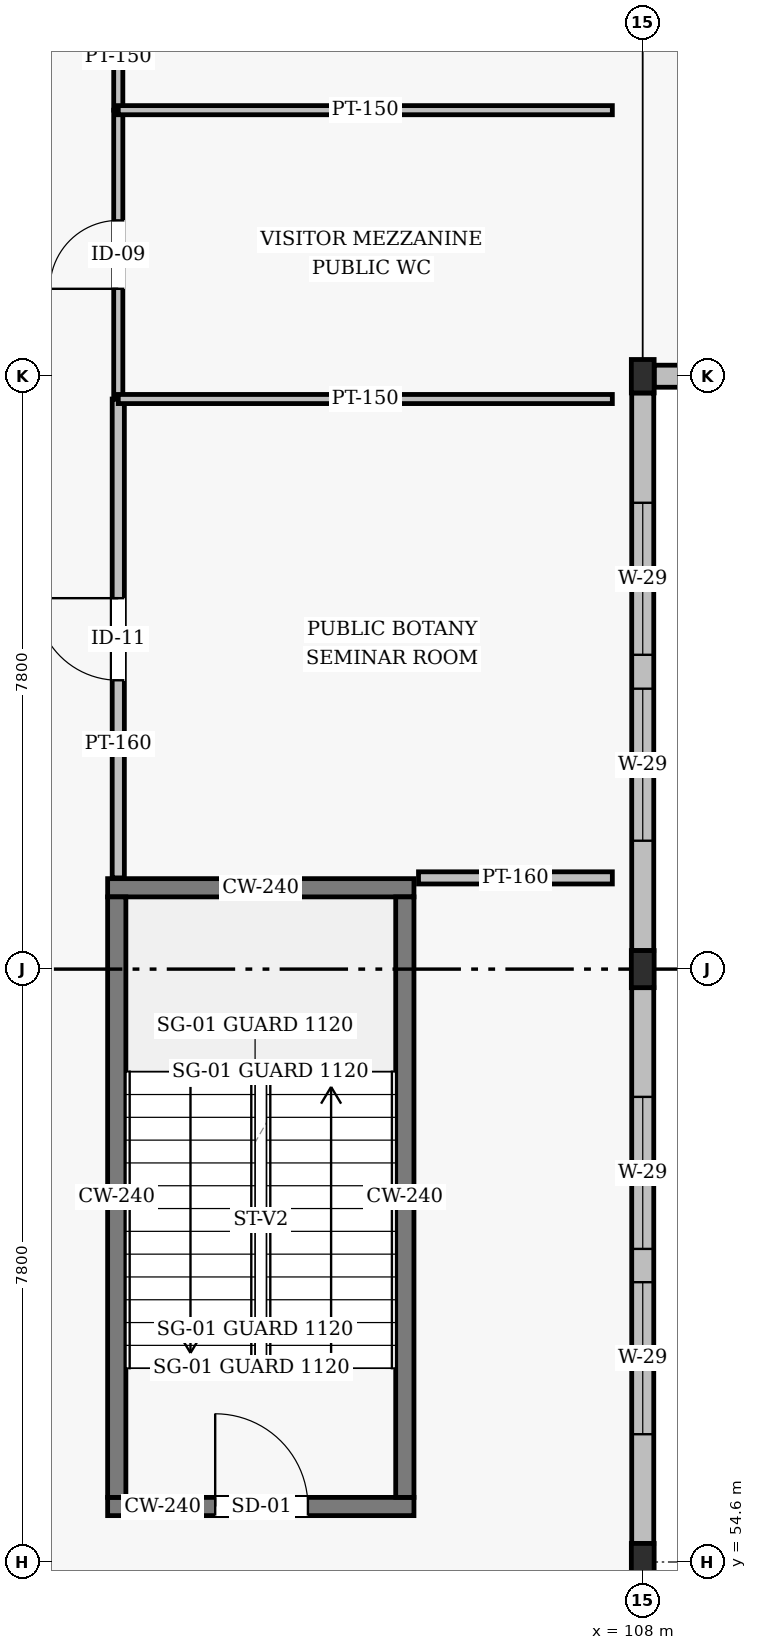
"""IFC4 building model, lengths in metres.
Left out: names, types, materials, properties, quantities, classifications, styles, units other than length and angle.
Written with IfcOpenShell. Run it as: python <this file> out.ifc"""

import sys

from ifc_helpers import new_model, si_unit, direction, frame, frame_2d, origin, origin_2d, place, context, subcontext, project, spatial, rectangle, i_section, extrude, element, fill, save


model = new_model("IFC4")
c1 = context("Model", 3, precision=1e-05, world=origin(), true_north=direction((0.0, 1.0)))
c2 = subcontext(c1, "Body", "Model", "MODEL_VIEW")
j1 = project(units=[si_unit("LENGTHUNIT", "METRE"), si_unit("PLANEANGLEUNIT", "RADIAN")], contexts=[c1])
p1 = place(None, origin())
s1 = spatial("IfcSite", under=j1, at=p1, CompositionType="ELEMENT")
p2 = place(p1, origin())
s2 = spatial("IfcBuilding", under=s1, at=p2, CompositionType="ELEMENT")
p3 = place(p2, frame((0.0, 0.0, 4.8)))
s3 = spatial("IfcBuildingStorey", under=s2, at=p3, CompositionType="ELEMENT", Elevation=4.8)
for number, where, z_axis, x_axis in (
    (1, (108.0, 54.6, 0.0), (0.0, 0.0, 1.0), (1.0, 0.0, 0.0)),
    (2, (108.0, 62.4, 0.0), (0.0, 0.0, 1.0), (1.0, 0.0, 0.0)),
):
    element("IfcColumn", number, at=place(p3, frame(where, z_axis=z_axis, x_axis=x_axis)), inside=s3, PredefinedType="COLUMN", context=c2, shape_type="SweptSolid", body=[
        extrude(i_section(OverallWidth=0.3, OverallDepth=0.488, WebThickness=0.011, FlangeThickness=0.018, FilletRadius=0.024, at=origin_2d()), origin(), (0.0, 0.0, 1.0), 4.2),
    ])
p4 = place(p3, frame((108.0, 70.2, 0.0), z_axis=(0.0, 0.0, 1.0), x_axis=(1.0, 0.0, 0.0)))
e3 = element("IfcColumn", 3, at=p4, inside=s3, PredefinedType="COLUMN", context=c2, shape_type="SweptSolid", body=[
    extrude(i_section(OverallWidth=0.3, OverallDepth=0.44, WebThickness=0.011, FlangeThickness=0.018, FilletRadius=0.024, at=origin_2d()), origin(), (0.0, 0.0, 1.0), 4.2),
])
p5 = place(p3, frame((108.0, 54.844, 0.0), z_axis=(0.0, 0.0, 1.0), x_axis=(0.0, 1.0, 0.0)))
e4 = element("IfcWall", 4, at=p5, inside=s3, PredefinedType="SOLIDWALL", context=c2, shape_type="SweptSolid", body=[
    extrude(rectangle(XDim=7.312, YDim=0.29, at=frame_2d((3.656, 0.0))), origin(), (0.0, 0.0, 1.0), 3.461),
])
p6 = place(p5, frame((1.437, 0.0, 0.78)))
e5 = element("IfcOpeningElement", 5, at=p6, cuts=e4, PredefinedType="OPENING", context=c2, shape_type="SweptSolid", body=[
    extrude(rectangle(XDim=2.0, YDim=2.35, at=frame_2d((1.0, 1.175))), frame((0.0, 0.155, 0.0), z_axis=(0.0, -1.0, 0.0), x_axis=(1.0, 0.0, 0.0)), (0.0, 0.0, 1.0), 0.31),
])
p7 = place(p5, frame((3.875, 0.0, 0.78)))
e6 = element("IfcOpeningElement", 6, at=p7, cuts=e4, PredefinedType="OPENING", context=c2, shape_type="SweptSolid", body=[
    extrude(rectangle(XDim=2.0, YDim=2.35, at=frame_2d((1.0, 1.175))), frame((0.0, 0.155, 0.0), z_axis=(0.0, -1.0, 0.0), x_axis=(1.0, 0.0, 0.0)), (0.0, 0.0, 1.0), 0.31),
])
p8 = place(p3, frame((108.0, 62.644, 0.0), z_axis=(0.0, 0.0, 1.0), x_axis=(0.0, 1.0, 0.0)))
e7 = element("IfcWall", 7, at=p8, inside=s3, PredefinedType="SOLIDWALL", context=c2, shape_type="SweptSolid", body=[
    extrude(rectangle(XDim=7.336, YDim=0.29, at=frame_2d((3.668, 0.0))), origin(), (0.0, 0.0, 1.0), 3.461),
])
p9 = place(p8, frame((1.445, 0.0, 0.78)))
e8 = element("IfcOpeningElement", 8, at=p9, cuts=e7, PredefinedType="OPENING", context=c2, shape_type="SweptSolid", body=[
    extrude(rectangle(XDim=2.0, YDim=2.35, at=frame_2d((1.0, 1.175))), frame((0.0, 0.155, 0.0), z_axis=(0.0, -1.0, 0.0), x_axis=(1.0, 0.0, 0.0)), (0.0, 0.0, 1.0), 0.31),
])
p10 = place(p8, frame((3.891, 0.0, 0.78)))
e9 = element("IfcOpeningElement", 9, at=p10, cuts=e7, PredefinedType="OPENING", context=c2, shape_type="SweptSolid", body=[
    extrude(rectangle(XDim=2.0, YDim=2.35, at=frame_2d((1.0, 1.175))), frame((0.0, 0.155, 0.0), z_axis=(0.0, -1.0, 0.0), x_axis=(1.0, 0.0, 0.0)), (0.0, 0.0, 1.0), 0.31),
])
p11 = place(p3, frame((108.15, 70.2, 0.0), z_axis=(0.0, 0.0, 1.0), x_axis=(1.0, 0.0, 0.0)))
e10 = element("IfcWall", 10, at=p11, inside=s3, PredefinedType="SOLIDWALL", context=c2, shape_type="SweptSolid", body=[
    extrude(rectangle(XDim=8.25, YDim=0.29, at=frame_2d((4.125, 0.0))), origin(), (0.0, 0.0, 1.0), 3.955),
])
p12 = place(p11, frame((1.95, 0.0, 0.8)))
e11 = element("IfcOpeningElement", 11, at=p12, cuts=e10, PredefinedType="OPENING", context=c2, shape_type="SweptSolid", body=[
    extrude(rectangle(XDim=1.6, YDim=2.3, at=frame_2d((0.8, 1.15))), frame((0.0, 0.155, 0.0), z_axis=(0.0, -1.0, 0.0), x_axis=(1.0, 0.0, 0.0)), (0.0, 0.0, 1.0), 0.31),
])
p13 = place(p11, frame((4.7, 0.0, 0.8)))
e12 = element("IfcOpeningElement", 12, at=p13, cuts=e10, PredefinedType="OPENING", context=c2, shape_type="SweptSolid", body=[
    extrude(rectangle(XDim=1.6, YDim=2.3, at=frame_2d((0.8, 1.15))), frame((0.0, 0.155, 0.0), z_axis=(0.0, -1.0, 0.0), x_axis=(1.0, 0.0, 0.0)), (0.0, 0.0, 1.0), 0.31),
])
p14 = place(p3, frame((100.96, 55.33, 0.0), z_axis=(0.0, 0.0, 1.0), x_axis=(1.0, 0.0, 0.0)))
e13 = element("IfcWall", 13, at=p14, inside=s3, PredefinedType="SHEAR", context=c2, shape_type="SweptSolid", body=[
    extrude(rectangle(XDim=4.03, YDim=0.24, at=frame_2d((2.015, 0.0))), origin(), (0.0, 0.0, 1.0), 3.955),
])
p15 = place(p14, frame((1.415, 0.0, 0.0)))
e14 = element("IfcOpeningElement", 14, at=p15, cuts=e13, PredefinedType="OPENING", context=c2, shape_type="SweptSolid", body=[
    extrude(rectangle(XDim=1.22, YDim=2.18, at=frame_2d((0.61, 1.09))), frame((0.0, 0.13, 0.0), z_axis=(0.0, -1.0, 0.0), x_axis=(1.0, 0.0, 0.0)), (0.0, 0.0, 1.0), 0.26),
])
p16 = place(p3, frame((100.96, 63.47, 0.0), z_axis=(0.0, 0.0, 1.0), x_axis=(1.0, 0.0, 0.0)))
e15 = element("IfcWall", 15, at=p16, inside=s3, PredefinedType="SHEAR", context=c2, shape_type="SweptSolid", body=[
    extrude(rectangle(XDim=4.03, YDim=0.24, at=frame_2d((2.015, 0.0))), origin(), (0.0, 0.0, 1.0), 3.955),
])
for number, where, z_axis, x_axis in (
    (16, (101.08, 55.45, 0.0), (0.0, 0.0, 1.0), (0.0, 1.0, 0.0)),
    (17, (104.87, 55.45, 0.0), (0.0, 0.0, 1.0), (0.0, 1.0, 0.0)),
):
    element("IfcWall", number, at=place(p3, frame(where, z_axis=z_axis, x_axis=x_axis)), inside=s3, PredefinedType="SHEAR", context=c2, shape_type="SweptSolid", body=[
        extrude(rectangle(XDim=7.9, YDim=0.24, at=frame_2d((3.95, 0.0))), origin(), (0.0, 0.0, 1.0), 3.955),
    ])
p17 = place(p3, frame((101.1, 63.6, 0.0), z_axis=(0.0, 0.0, 1.0), x_axis=(0.0, 1.0, 0.0)))
e18 = element("IfcWall", 18, at=p17, inside=s3, PredefinedType="PARTITIONING", context=c2, shape_type="SweptSolid", body=[
    extrude(rectangle(XDim=6.3, YDim=0.16, at=frame_2d((3.15, 0.0))), origin(), (0.0, 0.0, 1.0), 3.609),
])
p18 = place(p17, frame((2.6, 0.0, 0.0)))
e19 = element("IfcOpeningElement", 19, at=p18, cuts=e18, PredefinedType="OPENING", context=c2, shape_type="SweptSolid", body=[
    extrude(rectangle(XDim=1.08, YDim=2.08, at=frame_2d((0.54, 1.04))), frame((0.0, 0.09, 0.0), z_axis=(0.0, -1.0, 0.0), x_axis=(1.0, 0.0, 0.0)), (0.0, 0.0, 1.0), 0.18),
])
p19 = place(p3, frame((105.05, 63.6, 0.0), z_axis=(0.0, 0.0, 1.0), x_axis=(1.0, 0.0, 0.0)))
e20 = element("IfcWall", 20, at=p19, inside=s3, PredefinedType="PARTITIONING", context=c2, shape_type="SweptSolid", body=[
    extrude(rectangle(XDim=2.55, YDim=0.16, at=frame_2d((1.275, 0.0))), origin(), (0.0, 0.0, 1.0), 3.955),
])
p20 = place(p3, frame((101.1, 69.9, 0.0), z_axis=(0.0, 0.0, 1.0), x_axis=(0.0, 1.0, 0.0)))
e21 = element("IfcWall", 21, at=p20, inside=s3, PredefinedType="PARTITIONING", context=c2, shape_type="SweptSolid", body=[
    extrude(rectangle(XDim=3.8, YDim=0.12, at=frame_2d((1.9, 0.0))), origin(), (0.0, 0.0, 1.0), 3.459),
])
p21 = place(p20, frame((1.45, 0.0, 0.0)))
e22 = element("IfcOpeningElement", 22, at=p21, cuts=e21, PredefinedType="OPENING", context=c2, shape_type="SweptSolid", body=[
    extrude(rectangle(XDim=0.9, YDim=2.1, at=frame_2d((0.45, 1.05))), frame((0.0, 0.07, 0.0), z_axis=(0.0, -1.0, 0.0), x_axis=(1.0, 0.0, 0.0)), (0.0, 0.0, 1.0), 0.14),
])
p22 = place(p3, frame((101.1, 73.7, 0.0), z_axis=(0.0, 0.0, 1.0), x_axis=(0.0, 1.0, 0.0)))
e23 = element("IfcWall", 23, at=p22, inside=s3, PredefinedType="PARTITIONING", context=c2, shape_type="SweptSolid", body=[
    extrude(rectangle(XDim=3.9, YDim=0.12, at=frame_2d((1.95, 0.0))), origin(), (0.0, 0.0, 1.0), 3.609),
])
p23 = place(p22, frame((1.45, 0.0, 0.0)))
e24 = element("IfcOpeningElement", 24, at=p23, cuts=e23, PredefinedType="OPENING", context=c2, shape_type="SweptSolid", body=[
    extrude(rectangle(XDim=1.0, YDim=2.1, at=frame_2d((0.5, 1.05))), frame((0.0, 0.07, 0.0), z_axis=(0.0, -1.0, 0.0), x_axis=(1.0, 0.0, 0.0)), (0.0, 0.0, 1.0), 0.14),
])
for number, where, z_axis, x_axis in (
    (25, (101.1, 69.9, 0.0), (0.0, 0.0, 1.0), (1.0, 0.0, 0.0)),
    (26, (101.1, 73.7, 0.0), (0.0, 0.0, 1.0), (1.0, 0.0, 0.0)),
):
    element("IfcWall", number, at=place(p3, frame(where, z_axis=z_axis, x_axis=x_axis)), inside=s3, PredefinedType="PARTITIONING", context=c2, shape_type="SweptSolid", body=[
        extrude(rectangle(XDim=6.5, YDim=0.12, at=frame_2d((3.25, 0.0))), origin(), (0.0, 0.0, 1.0), 3.955),
    ])
p24 = place(p6, origin())
e27 = element("IfcWindow", 27, at=p24, inside=s3, PartitioningType="SINGLE_PANEL", PredefinedType="WINDOW", context=c2, shape_type="SweptSolid", body=[
    extrude(rectangle(XDim=2.0, YDim=2.35, at=frame_2d((1.0, 1.175))), frame((0.0, 0.03, 0.0), z_axis=(0.0, -1.0, 0.0), x_axis=(1.0, 0.0, 0.0)), (0.0, 0.0, 1.0), 0.06),
])
fill(e5, e27)
p25 = place(p7, origin())
e28 = element("IfcWindow", 28, at=p25, inside=s3, PartitioningType="SINGLE_PANEL", PredefinedType="WINDOW", context=c2, shape_type="SweptSolid", body=[
    extrude(rectangle(XDim=2.0, YDim=2.35, at=frame_2d((1.0, 1.175))), frame((0.0, 0.03, 0.0), z_axis=(0.0, -1.0, 0.0), x_axis=(1.0, 0.0, 0.0)), (0.0, 0.0, 1.0), 0.06),
])
fill(e6, e28)
p26 = place(p9, origin())
e29 = element("IfcWindow", 29, at=p26, inside=s3, PartitioningType="SINGLE_PANEL", PredefinedType="WINDOW", context=c2, shape_type="SweptSolid", body=[
    extrude(rectangle(XDim=2.0, YDim=2.35, at=frame_2d((1.0, 1.175))), frame((0.0, 0.03, 0.0), z_axis=(0.0, -1.0, 0.0), x_axis=(1.0, 0.0, 0.0)), (0.0, 0.0, 1.0), 0.06),
])
fill(e8, e29)
p27 = place(p10, origin())
e30 = element("IfcWindow", 30, at=p27, inside=s3, PartitioningType="SINGLE_PANEL", PredefinedType="WINDOW", context=c2, shape_type="SweptSolid", body=[
    extrude(rectangle(XDim=2.0, YDim=2.35, at=frame_2d((1.0, 1.175))), frame((0.0, 0.03, 0.0), z_axis=(0.0, -1.0, 0.0), x_axis=(1.0, 0.0, 0.0)), (0.0, 0.0, 1.0), 0.06),
])
fill(e9, e30)
p28 = place(p15, origin())
e31 = element("IfcDoor", 31, at=p28, inside=s3, OperationType="SINGLE_SWING_LEFT", PredefinedType="DOOR", context=c2, shape_type="SweptSolid", body=[
    extrude(rectangle(XDim=1.22, YDim=2.18, at=frame_2d((0.61, 1.09))), frame((0.0, 0.025, 0.0), z_axis=(0.0, -1.0, 0.0), x_axis=(1.0, 0.0, 0.0)), (0.0, 0.0, 1.0), 0.05),
])
fill(e14, e31)
p29 = place(p18, origin())
e32 = element("IfcDoor", 32, at=p29, inside=s3, OperationType="SINGLE_SWING_RIGHT", PredefinedType="DOOR", context=c2, shape_type="SweptSolid", body=[
    extrude(rectangle(XDim=1.08, YDim=2.08, at=frame_2d((0.54, 1.04))), frame((0.0, 0.025, 0.0), z_axis=(0.0, -1.0, 0.0), x_axis=(1.0, 0.0, 0.0)), (0.0, 0.0, 1.0), 0.05),
])
fill(e19, e32)
p30 = place(p21, origin())
e33 = element("IfcDoor", 33, at=p30, inside=s3, OperationType="SINGLE_SWING_LEFT", PredefinedType="DOOR", context=c2, shape_type="SweptSolid", body=[
    extrude(rectangle(XDim=0.9, YDim=2.1, at=frame_2d((0.45, 1.05))), frame((0.0, 0.025, 0.0), z_axis=(0.0, -1.0, 0.0), x_axis=(1.0, 0.0, 0.0)), (0.0, 0.0, 1.0), 0.05),
])
fill(e22, e33)
save(model, sys.argv[1])
